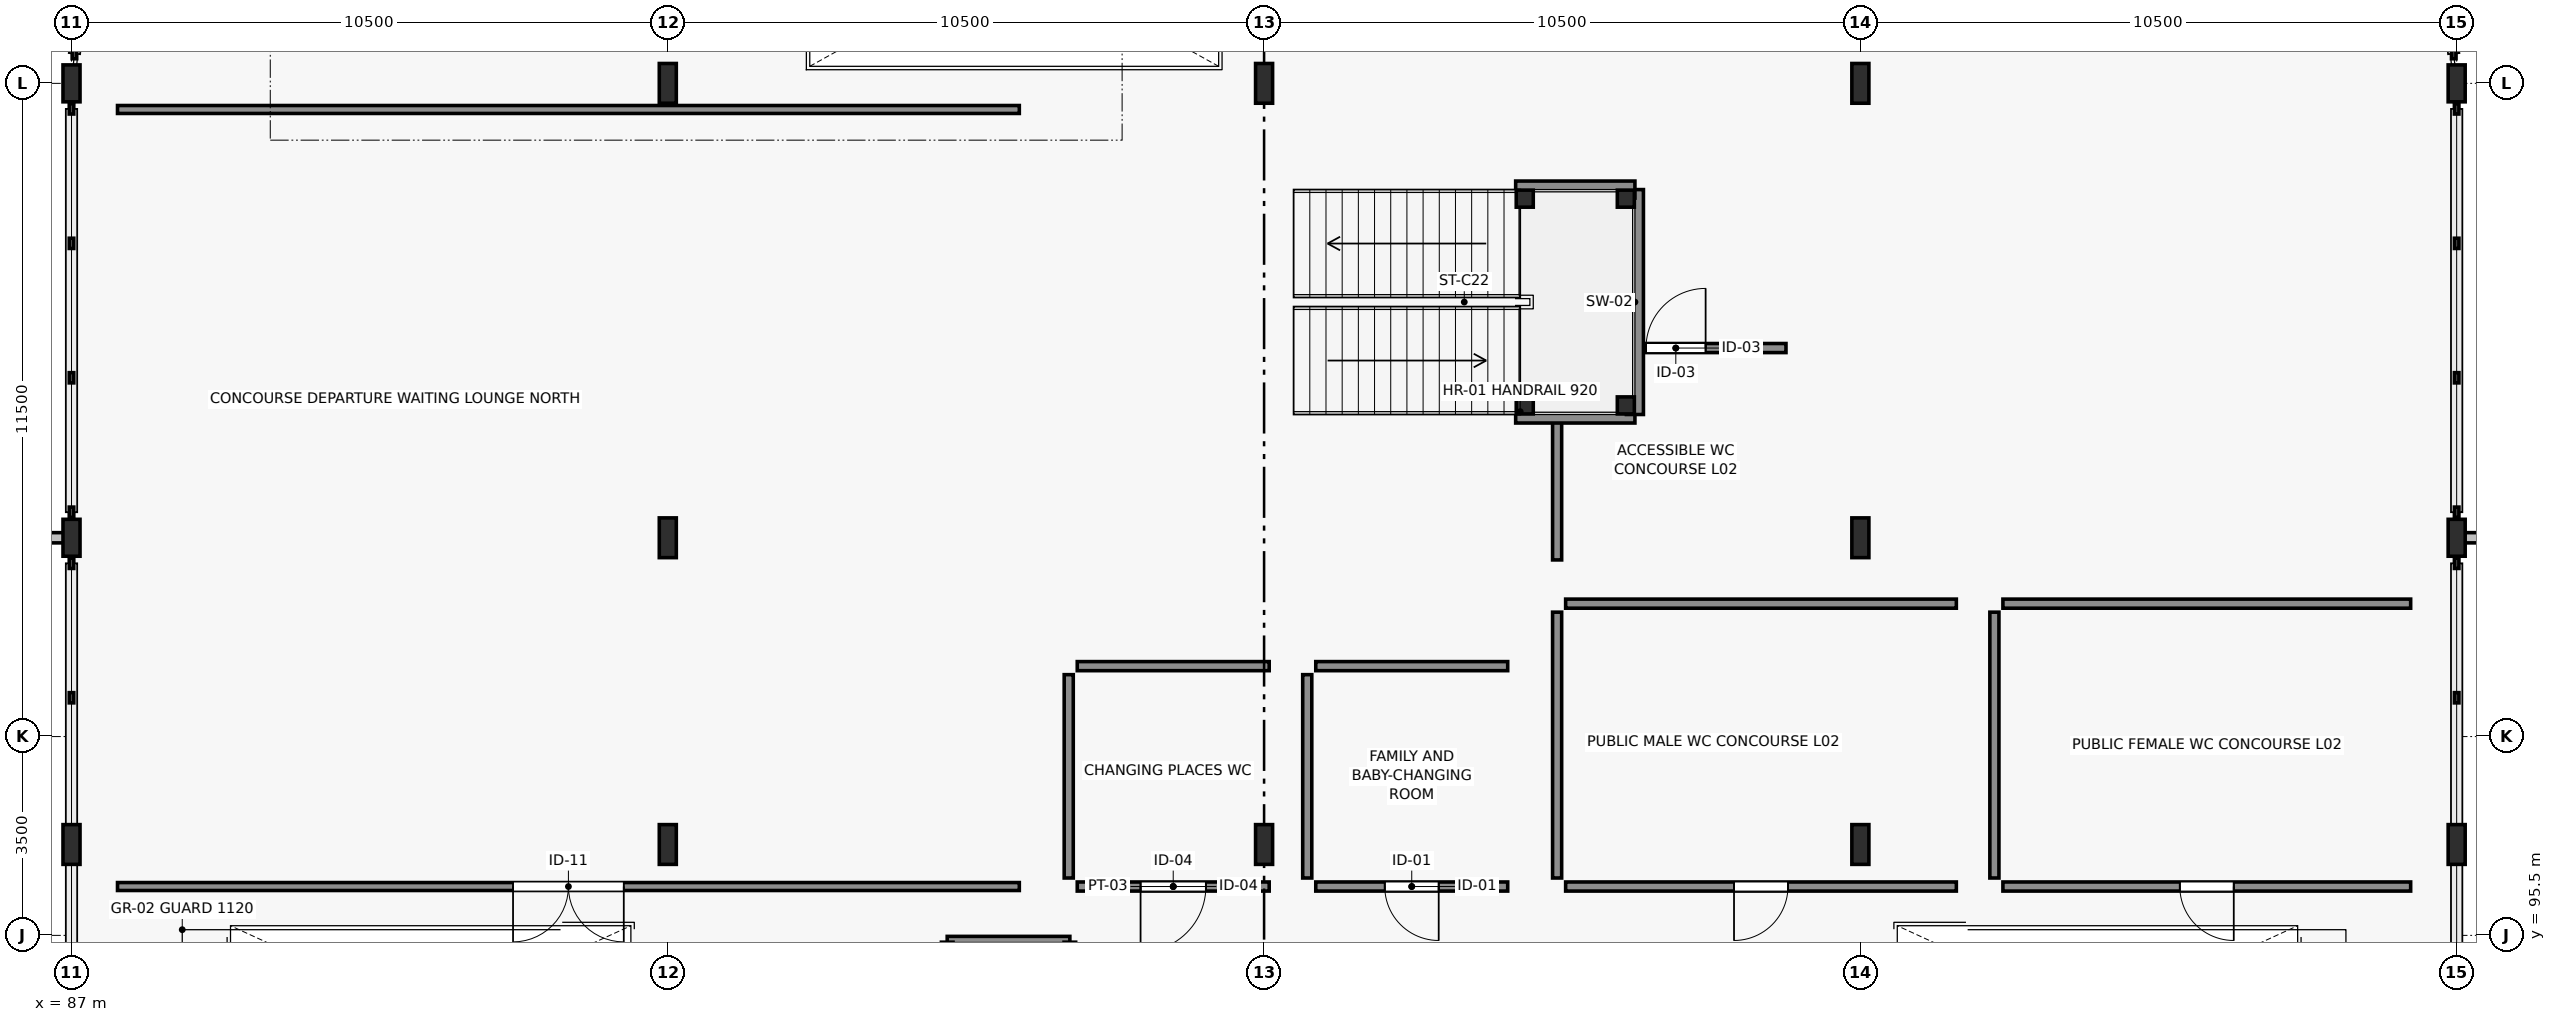
"""IFC4 building model, lengths in metres.
Left out: names, types, materials, properties, quantities, classifications, styles, units other than length and angle.
Written with IfcOpenShell. Run it as: python <this file> out.ifc"""

import sys

from ifc_helpers import new_model, si_unit, direction, frame, frame_2d, origin, origin_2d, place, context, subcontext, project, spatial, rectangle, hollow_rectangle, i_section, extrude, element, fill, save


model = new_model("IFC4")
c1 = context("Model", 3, precision=1e-05, world=origin(), true_north=direction((0.0, 1.0)))
c2 = subcontext(c1, "Body", "Model", "MODEL_VIEW")
j1 = project(units=[si_unit("LENGTHUNIT", "METRE"), si_unit("PLANEANGLEUNIT", "RADIAN")], contexts=[c1])
p1 = place(None, origin())
s1 = spatial("IfcSite", under=j1, at=p1, CompositionType="ELEMENT")
p2 = place(p1, origin())
s2 = spatial("IfcBuilding", under=s1, at=p2, CompositionType="ELEMENT")
p3 = place(p2, frame((0.0, 0.0, 9.8)))
s3 = spatial("IfcBuildingStorey", under=s2, at=p3, CompositionType="ELEMENT", Elevation=9.8)
p4 = place(p3, frame((87.0, 102.5, 0.0), z_axis=(0.0, 0.0, 1.0), x_axis=(1.0, 0.0, 0.0)))
e1 = element("IfcColumn", 1, at=p4, inside=s3, PredefinedType="COLUMN", context=c2, shape_type="SweptSolid", body=[
    extrude(i_section(OverallWidth=0.3, OverallDepth=0.65, WebThickness=0.016, FlangeThickness=0.031, FilletRadius=0.027, at=origin_2d()), origin(), (0.0, 0.0, 1.0), 5.2),
])
for number, where, z_axis, x_axis in (
    (2, (97.5, 102.5, 0.0), (0.0, 0.0, 1.0), (1.0, 0.0, 0.0)),
    (3, (118.5, 102.5, 0.0), (0.0, 0.0, 1.0), (1.0, 0.0, 0.0)),
):
    element("IfcColumn", number, at=place(p3, frame(where, z_axis=z_axis, x_axis=x_axis)), inside=s3, PredefinedType="COLUMN", context=c2, shape_type="SweptSolid", body=[
        extrude(i_section(OverallWidth=0.3, OverallDepth=0.7, WebThickness=0.017, FlangeThickness=0.032, FilletRadius=0.027, at=origin_2d()), origin(), (0.0, 0.0, 1.0), 5.0),
    ])
for number, where, z_axis, x_axis in (
    (4, (129.0, 102.5, 0.0), (0.0, 0.0, 1.0), (1.0, 0.0, 0.0)),
    (5, (87.0, 110.5, 0.0), (0.0, 0.0, 1.0), (1.0, 0.0, 0.0)),
):
    element("IfcColumn", number, at=place(p3, frame(where, z_axis=z_axis, x_axis=x_axis)), inside=s3, PredefinedType="COLUMN", context=c2, shape_type="SweptSolid", body=[
        extrude(i_section(OverallWidth=0.3, OverallDepth=0.65, WebThickness=0.016, FlangeThickness=0.031, FilletRadius=0.027, at=origin_2d()), origin(), (0.0, 0.0, 1.0), 5.2),
    ])
for number, where, z_axis, x_axis in (
    (6, (97.5, 110.5, 0.0), (0.0, 0.0, 1.0), (1.0, 0.0, 0.0)),
    (7, (118.5, 110.5, 0.0), (0.0, 0.0, 1.0), (1.0, 0.0, 0.0)),
):
    element("IfcColumn", number, at=place(p3, frame(where, z_axis=z_axis, x_axis=x_axis)), inside=s3, PredefinedType="COLUMN", context=c2, shape_type="SweptSolid", body=[
        extrude(i_section(OverallWidth=0.3, OverallDepth=0.7, WebThickness=0.017, FlangeThickness=0.032, FilletRadius=0.027, at=origin_2d()), origin(), (0.0, 0.0, 1.0), 5.0),
    ])
p5 = place(p3, frame((129.0, 110.5, 0.0), z_axis=(0.0, 0.0, 1.0), x_axis=(1.0, 0.0, 0.0)))
e8 = element("IfcColumn", 8, at=p5, inside=s3, PredefinedType="COLUMN", context=c2, shape_type="SweptSolid", body=[
    extrude(i_section(OverallWidth=0.3, OverallDepth=0.65, WebThickness=0.016, FlangeThickness=0.031, FilletRadius=0.027, at=origin_2d()), origin(), (0.0, 0.0, 1.0), 5.2),
])
for number, where, z_axis, x_axis in (
    (9, (108.0, 110.5, 0.0), (0.0, 0.0, 1.0), (1.0, 0.0, 0.0)),
    (10, (87.0, 97.1, 0.0), (0.0, 0.0, 1.0), (1.0, 0.0, 0.0)),
    (11, (97.5, 97.1, 0.0), (0.0, 0.0, 1.0), (1.0, 0.0, 0.0)),
    (12, (108.0, 97.1, 0.0), (0.0, 0.0, 1.0), (1.0, 0.0, 0.0)),
    (13, (118.5, 97.1, 0.0), (0.0, 0.0, 1.0), (1.0, 0.0, 0.0)),
    (14, (129.0, 97.1, 0.0), (0.0, 0.0, 1.0), (1.0, 0.0, 0.0)),
):
    element("IfcColumn", number, at=place(p3, frame(where, z_axis=z_axis, x_axis=x_axis)), inside=s3, PredefinedType="COLUMN", context=c2, shape_type="SweptSolid", body=[
        extrude(i_section(OverallWidth=0.3, OverallDepth=0.7, WebThickness=0.017, FlangeThickness=0.032, FilletRadius=0.027, at=origin_2d()), origin(), (0.0, 0.0, 1.0), 4.995),
    ])
p6 = place(p3, frame((103.69, 96.36, 0.0), z_axis=(0.0, 0.0, 1.0), x_axis=(-1.0, 0.0, 0.0)))
e15 = element("IfcWall", 15, at=p6, inside=s3, PredefinedType="PARTITIONING", context=c2, shape_type="SweptSolid", body=[
    extrude(rectangle(XDim=15.88, YDim=0.14, at=frame_2d((7.94, 0.0))), origin(), (0.0, 0.0, 1.0), 4.95),
])
p7 = place(p6, frame((6.965, 0.0, 0.0)))
e16 = element("IfcOpeningElement", 16, at=p7, cuts=e15, PredefinedType="OPENING", context=c2, shape_type="SweptSolid", body=[
    extrude(rectangle(XDim=1.95, YDim=2.35, at=frame_2d((0.975, 1.175))), frame((0.0, 0.08, 0.0), z_axis=(0.0, -1.0, 0.0), x_axis=(1.0, 0.0, 0.0)), (0.0, 0.0, 1.0), 0.16),
])
p8 = place(p3, frame((87.81, 110.04, 0.0), z_axis=(0.0, 0.0, 1.0), x_axis=(1.0, 0.0, 0.0)))
e17 = element("IfcWall", 17, at=p8, inside=s3, PredefinedType="PARTITIONING", context=c2, shape_type="SweptSolid", body=[
    extrude(rectangle(XDim=15.88, YDim=0.14, at=frame_2d((7.94, 0.0))), origin(), (0.0, 0.0, 1.0), 4.575),
])
p9 = place(p3, frame((108.09, 96.36, 0.0), z_axis=(0.0, 0.0, 1.0), x_axis=(-1.0, 0.0, 0.0)))
e18 = element("IfcWall", 18, at=p9, inside=s3, PredefinedType="PARTITIONING", context=c2, shape_type="SweptSolid", body=[
    extrude(rectangle(XDim=3.38, YDim=0.16, at=frame_2d((1.69, 0.0))), origin(), (0.0, 0.0, 1.0), 4.95),
])
p10 = place(p9, frame((1.115, 0.0, 0.0)))
e19 = element("IfcOpeningElement", 19, at=p10, cuts=e18, PredefinedType="OPENING", context=c2, shape_type="SweptSolid", body=[
    extrude(rectangle(XDim=1.15, YDim=2.2, at=frame_2d((0.575, 1.1))), frame((0.0, 0.09, 0.0), z_axis=(0.0, -1.0, 0.0), x_axis=(1.0, 0.0, 0.0)), (0.0, 0.0, 1.0), 0.18),
])
p11 = place(p3, frame((104.56, 96.51, 0.0), z_axis=(0.0, 0.0, 1.0), x_axis=(0.0, 1.0, 0.0)))
e20 = element("IfcWall", 20, at=p11, inside=s3, PredefinedType="PARTITIONING", context=c2, shape_type="SweptSolid", body=[
    extrude(rectangle(XDim=3.58, YDim=0.16, at=frame_2d((1.79, 0.0))), origin(), (0.0, 0.0, 1.0), 4.575),
])
p12 = place(p3, frame((104.71, 100.24, 0.0), z_axis=(0.0, 0.0, 1.0), x_axis=(1.0, 0.0, 0.0)))
e21 = element("IfcWall", 21, at=p12, inside=s3, PredefinedType="PARTITIONING", context=c2, shape_type="SweptSolid", body=[
    extrude(rectangle(XDim=3.38, YDim=0.16, at=frame_2d((1.69, 0.0))), origin(), (0.0, 0.0, 1.0), 4.575),
])
p13 = place(p3, frame((112.29, 96.36, 0.0), z_axis=(0.0, 0.0, 1.0), x_axis=(-1.0, 0.0, 0.0)))
e22 = element("IfcWall", 22, at=p13, inside=s3, PredefinedType="PARTITIONING", context=c2, shape_type="SweptSolid", body=[
    extrude(rectangle(XDim=3.38, YDim=0.16, at=frame_2d((1.69, 0.0))), origin(), (0.0, 0.0, 1.0), 4.95),
])
p14 = place(p13, frame((1.215, 0.0, 0.0)))
e23 = element("IfcOpeningElement", 23, at=p14, cuts=e22, PredefinedType="OPENING", context=c2, shape_type="SweptSolid", body=[
    extrude(rectangle(XDim=0.95, YDim=2.15, at=frame_2d((0.475, 1.075))), frame((0.0, 0.09, 0.0), z_axis=(0.0, -1.0, 0.0), x_axis=(1.0, 0.0, 0.0)), (0.0, 0.0, 1.0), 0.18),
])
p15 = place(p3, frame((108.76, 96.51, 0.0), z_axis=(0.0, 0.0, 1.0), x_axis=(0.0, 1.0, 0.0)))
e24 = element("IfcWall", 24, at=p15, inside=s3, PredefinedType="PARTITIONING", context=c2, shape_type="SweptSolid", body=[
    extrude(rectangle(XDim=3.58, YDim=0.16, at=frame_2d((1.79, 0.0))), origin(), (0.0, 0.0, 1.0), 4.575),
])
p16 = place(p3, frame((108.91, 100.24, 0.0), z_axis=(0.0, 0.0, 1.0), x_axis=(1.0, 0.0, 0.0)))
e25 = element("IfcWall", 25, at=p16, inside=s3, PredefinedType="PARTITIONING", context=c2, shape_type="SweptSolid", body=[
    extrude(rectangle(XDim=3.38, YDim=0.16, at=frame_2d((1.69, 0.0))), origin(), (0.0, 0.0, 1.0), 4.745),
])
p17 = place(p3, frame((120.19, 96.36, 0.0), z_axis=(0.0, 0.0, 1.0), x_axis=(-1.0, 0.0, 0.0)))
e26 = element("IfcWall", 26, at=p17, inside=s3, PredefinedType="PARTITIONING", context=c2, shape_type="SweptSolid", body=[
    extrude(rectangle(XDim=6.88, YDim=0.16, at=frame_2d((3.44, 0.0))), origin(), (0.0, 0.0, 1.0), 4.95),
])
p18 = place(p17, frame((2.965, 0.0, 0.0)))
e27 = element("IfcOpeningElement", 27, at=p18, cuts=e26, PredefinedType="OPENING", context=c2, shape_type="SweptSolid", body=[
    extrude(rectangle(XDim=0.95, YDim=2.15, at=frame_2d((0.475, 1.075))), frame((0.0, 0.09, 0.0), z_axis=(0.0, -1.0, 0.0), x_axis=(1.0, 0.0, 0.0)), (0.0, 0.0, 1.0), 0.18),
])
p19 = place(p3, frame((113.16, 96.51, 0.0), z_axis=(0.0, 0.0, 1.0), x_axis=(0.0, 1.0, 0.0)))
e28 = element("IfcWall", 28, at=p19, inside=s3, PredefinedType="PARTITIONING", context=c2, shape_type="SweptSolid", body=[
    extrude(rectangle(XDim=4.68, YDim=0.16, at=frame_2d((2.34, 0.0))), origin(), (0.0, 0.0, 1.0), 4.575),
])
p20 = place(p3, frame((113.31, 101.34, 0.0), z_axis=(0.0, 0.0, 1.0), x_axis=(1.0, 0.0, 0.0)))
e29 = element("IfcWall", 29, at=p20, inside=s3, PredefinedType="PARTITIONING", context=c2, shape_type="SweptSolid", body=[
    extrude(rectangle(XDim=6.88, YDim=0.16, at=frame_2d((3.44, 0.0))), origin(), (0.0, 0.0, 1.0), 4.575),
])
p21 = place(p3, frame((128.19, 96.36, 0.0), z_axis=(0.0, 0.0, 1.0), x_axis=(-1.0, 0.0, 0.0)))
e30 = element("IfcWall", 30, at=p21, inside=s3, PredefinedType="PARTITIONING", context=c2, shape_type="SweptSolid", body=[
    extrude(rectangle(XDim=7.18, YDim=0.16, at=frame_2d((3.59, 0.0))), origin(), (0.0, 0.0, 1.0), 4.95),
])
p22 = place(p21, frame((3.115, 0.0, 0.0)))
e31 = element("IfcOpeningElement", 31, at=p22, cuts=e30, PredefinedType="OPENING", context=c2, shape_type="SweptSolid", body=[
    extrude(rectangle(XDim=0.95, YDim=2.15, at=frame_2d((0.475, 1.075))), frame((0.0, 0.09, 0.0), z_axis=(0.0, -1.0, 0.0), x_axis=(1.0, 0.0, 0.0)), (0.0, 0.0, 1.0), 0.18),
])
p23 = place(p3, frame((120.86, 96.51, 0.0), z_axis=(0.0, 0.0, 1.0), x_axis=(0.0, 1.0, 0.0)))
e32 = element("IfcWall", 32, at=p23, inside=s3, PredefinedType="PARTITIONING", context=c2, shape_type="SweptSolid", body=[
    extrude(rectangle(XDim=4.68, YDim=0.16, at=frame_2d((2.34, 0.0))), origin(), (0.0, 0.0, 1.0), 4.575),
])
p24 = place(p3, frame((121.01, 101.34, 0.0), z_axis=(0.0, 0.0, 1.0), x_axis=(1.0, 0.0, 0.0)))
e33 = element("IfcWall", 33, at=p24, inside=s3, PredefinedType="PARTITIONING", context=c2, shape_type="SweptSolid", body=[
    extrude(rectangle(XDim=7.18, YDim=0.16, at=frame_2d((3.59, 0.0))), origin(), (0.0, 0.0, 1.0), 4.745),
])
p25 = place(p3, frame((113.31, 105.84, 0.0), z_axis=(0.0, 0.0, 1.0), x_axis=(1.0, 0.0, 0.0)))
e34 = element("IfcWall", 34, at=p25, inside=s3, PredefinedType="PARTITIONING", context=c2, shape_type="SweptSolid", body=[
    extrude(rectangle(XDim=3.88, YDim=0.16, at=frame_2d((1.94, 0.0))), origin(), (0.0, 0.0, 1.0), 4.95),
])
p26 = place(p25, frame((1.415, 0.0, 0.0)))
e35 = element("IfcOpeningElement", 35, at=p26, cuts=e34, PredefinedType="OPENING", context=c2, shape_type="SweptSolid", body=[
    extrude(rectangle(XDim=1.05, YDim=2.2, at=frame_2d((0.525, 1.1))), frame((0.0, 0.09, 0.0), z_axis=(0.0, -1.0, 0.0), x_axis=(1.0, 0.0, 0.0)), (0.0, 0.0, 1.0), 0.18),
])
p27 = place(p3, frame((113.16, 102.11, 0.0), z_axis=(0.0, 0.0, 1.0), x_axis=(0.0, 1.0, 0.0)))
e36 = element("IfcWall", 36, at=p27, inside=s3, PredefinedType="PARTITIONING", context=c2, shape_type="SweptSolid", body=[
    extrude(rectangle(XDim=3.58, YDim=0.16, at=frame_2d((1.79, 0.0))), origin(), (0.0, 0.0, 1.0), 4.575),
])
p28 = place(p3, frame((102.42, 95.38, 0.0), z_axis=(0.0, 0.0, 1.0), x_axis=(1.0, 0.0, 0.0)))
e37 = element("IfcWall", 37, at=p28, inside=s3, PredefinedType="SOLIDWALL", context=c2, shape_type="SweptSolid", body=[
    extrude(rectangle(XDim=2.16, YDim=0.205, at=frame_2d((1.08, 0.0))), origin(), (0.0, 0.0, 1.0), 4.96),
])
for number, where, z_axis, x_axis in (
    (38, (102.42, 92.72, 0.0), (0.0, 0.0, 1.0), (0.0, 1.0, 0.0)),
    (39, (104.58, 95.38, 0.0), (0.0, 0.0, 1.0), (0.0, -1.0, 0.0)),
):
    element("IfcWall", number, at=place(p3, frame(where, z_axis=z_axis, x_axis=x_axis)), inside=s3, PredefinedType="SOLIDWALL", context=c2, shape_type="SweptSolid", body=[
        extrude(rectangle(XDim=2.66, YDim=0.205, at=frame_2d((1.33, 0.0))), origin(), (0.0, 0.0, 1.0), 4.96),
    ])
p29 = place(p3, frame((112.43, 104.67, 0.0), z_axis=(0.0, 0.0, 1.0), x_axis=(1.0, 0.0, 0.0)))
e40 = element("IfcWall", 40, at=p29, inside=s3, PredefinedType="SHEAR", context=c2, shape_type="SweptSolid", body=[
    extrude(rectangle(XDim=2.1, YDim=0.3, at=frame_2d((1.05, 0.0))), origin(), (0.0, 0.0, 1.0), 4.95),
])
p30 = place(p3, frame((114.53, 104.67, 0.0), z_axis=(0.0, 0.0, 1.0), x_axis=(0.0, 1.0, 0.0)))
e41 = element("IfcWall", 41, at=p30, inside=s3, PredefinedType="SHEAR", context=c2, shape_type="SweptSolid", body=[
    extrude(rectangle(XDim=3.96, YDim=0.3, at=frame_2d((1.98, 0.0))), origin(), (0.0, 0.0, 1.0), 4.95),
])
p31 = place(p3, frame((114.53, 108.63, 0.0), z_axis=(0.0, 0.0, 1.0), x_axis=(-1.0, 0.0, 0.0)))
e42 = element("IfcWall", 42, at=p31, inside=s3, PredefinedType="SHEAR", context=c2, shape_type="SweptSolid", body=[
    extrude(rectangle(XDim=2.1, YDim=0.3, at=frame_2d((1.05, 0.0))), origin(), (0.0, 0.0, 1.0), 4.95),
])
for number, where, z_axis, x_axis in (
    (43, (112.59, 104.83, 0.0), (0.0, 0.0, 1.0), (1.0, 0.0, 0.0)),
    (44, (114.37, 104.83, 0.0), (0.0, 0.0, 1.0), (1.0, 0.0, 0.0)),
    (45, (114.37, 108.47, 0.0), (0.0, 0.0, 1.0), (1.0, 0.0, 0.0)),
    (46, (112.59, 108.47, 0.0), (0.0, 0.0, 1.0), (1.0, 0.0, 0.0)),
):
    element("IfcColumn", number, at=place(p3, frame(where, z_axis=z_axis, x_axis=x_axis)), inside=s3, PredefinedType="COLUMN", context=c2, shape_type="SweptSolid", body=[
        extrude(hollow_rectangle(XDim=0.3, YDim=0.3, WallThickness=0.016, at=origin_2d()), origin(), (0.0, 0.0, 1.0), 2.28),
    ])
p32 = place(p7, origin())
e47 = element("IfcDoor", 47, at=p32, inside=s3, OperationType="DOUBLE_DOOR_SINGLE_SWING", PredefinedType="DOOR", context=c2, shape_type="SweptSolid", body=[
    extrude(rectangle(XDim=1.95, YDim=2.35, at=frame_2d((0.975, 1.175))), frame((0.0, 0.025, 0.0), z_axis=(0.0, -1.0, 0.0), x_axis=(1.0, 0.0, 0.0)), (0.0, 0.0, 1.0), 0.05),
])
fill(e16, e47)
p33 = place(p10, origin())
e48 = element("IfcDoor", 48, at=p33, inside=s3, OperationType="SINGLE_SWING_RIGHT", PredefinedType="DOOR", context=c2, shape_type="SweptSolid", body=[
    extrude(rectangle(XDim=1.15, YDim=2.2, at=frame_2d((0.575, 1.1))), frame((0.0, 0.025, 0.0), z_axis=(0.0, -1.0, 0.0), x_axis=(1.0, 0.0, 0.0)), (0.0, 0.0, 1.0), 0.05),
])
fill(e19, e48)
p34 = place(p14, origin())
e49 = element("IfcDoor", 49, at=p34, inside=s3, OperationType="SINGLE_SWING_LEFT", PredefinedType="DOOR", context=c2, shape_type="SweptSolid", body=[
    extrude(rectangle(XDim=0.95, YDim=2.15, at=frame_2d((0.475, 1.075))), frame((0.0, 0.025, 0.0), z_axis=(0.0, -1.0, 0.0), x_axis=(1.0, 0.0, 0.0)), (0.0, 0.0, 1.0), 0.05),
])
fill(e23, e49)
p35 = place(p18, origin())
e50 = element("IfcDoor", 50, at=p35, inside=s3, OperationType="SINGLE_SWING_RIGHT", PredefinedType="DOOR", context=c2, shape_type="SweptSolid", body=[
    extrude(rectangle(XDim=0.95, YDim=2.15, at=frame_2d((0.475, 1.075))), frame((0.0, 0.025, 0.0), z_axis=(0.0, -1.0, 0.0), x_axis=(1.0, 0.0, 0.0)), (0.0, 0.0, 1.0), 0.05),
])
fill(e27, e50)
p36 = place(p22, origin())
e51 = element("IfcDoor", 51, at=p36, inside=s3, OperationType="SINGLE_SWING_LEFT", PredefinedType="DOOR", context=c2, shape_type="SweptSolid", body=[
    extrude(rectangle(XDim=0.95, YDim=2.15, at=frame_2d((0.475, 1.075))), frame((0.0, 0.025, 0.0), z_axis=(0.0, -1.0, 0.0), x_axis=(1.0, 0.0, 0.0)), (0.0, 0.0, 1.0), 0.05),
])
fill(e31, e51)
p37 = place(p26, origin())
e52 = element("IfcDoor", 52, at=p37, inside=s3, OperationType="SINGLE_SWING_RIGHT", PredefinedType="DOOR", context=c2, shape_type="SweptSolid", body=[
    extrude(rectangle(XDim=1.05, YDim=2.2, at=frame_2d((0.525, 1.1))), frame((0.0, 0.025, 0.0), z_axis=(0.0, -1.0, 0.0), x_axis=(1.0, 0.0, 0.0)), (0.0, 0.0, 1.0), 0.05),
])
fill(e35, e52)
save(model, sys.argv[1])
